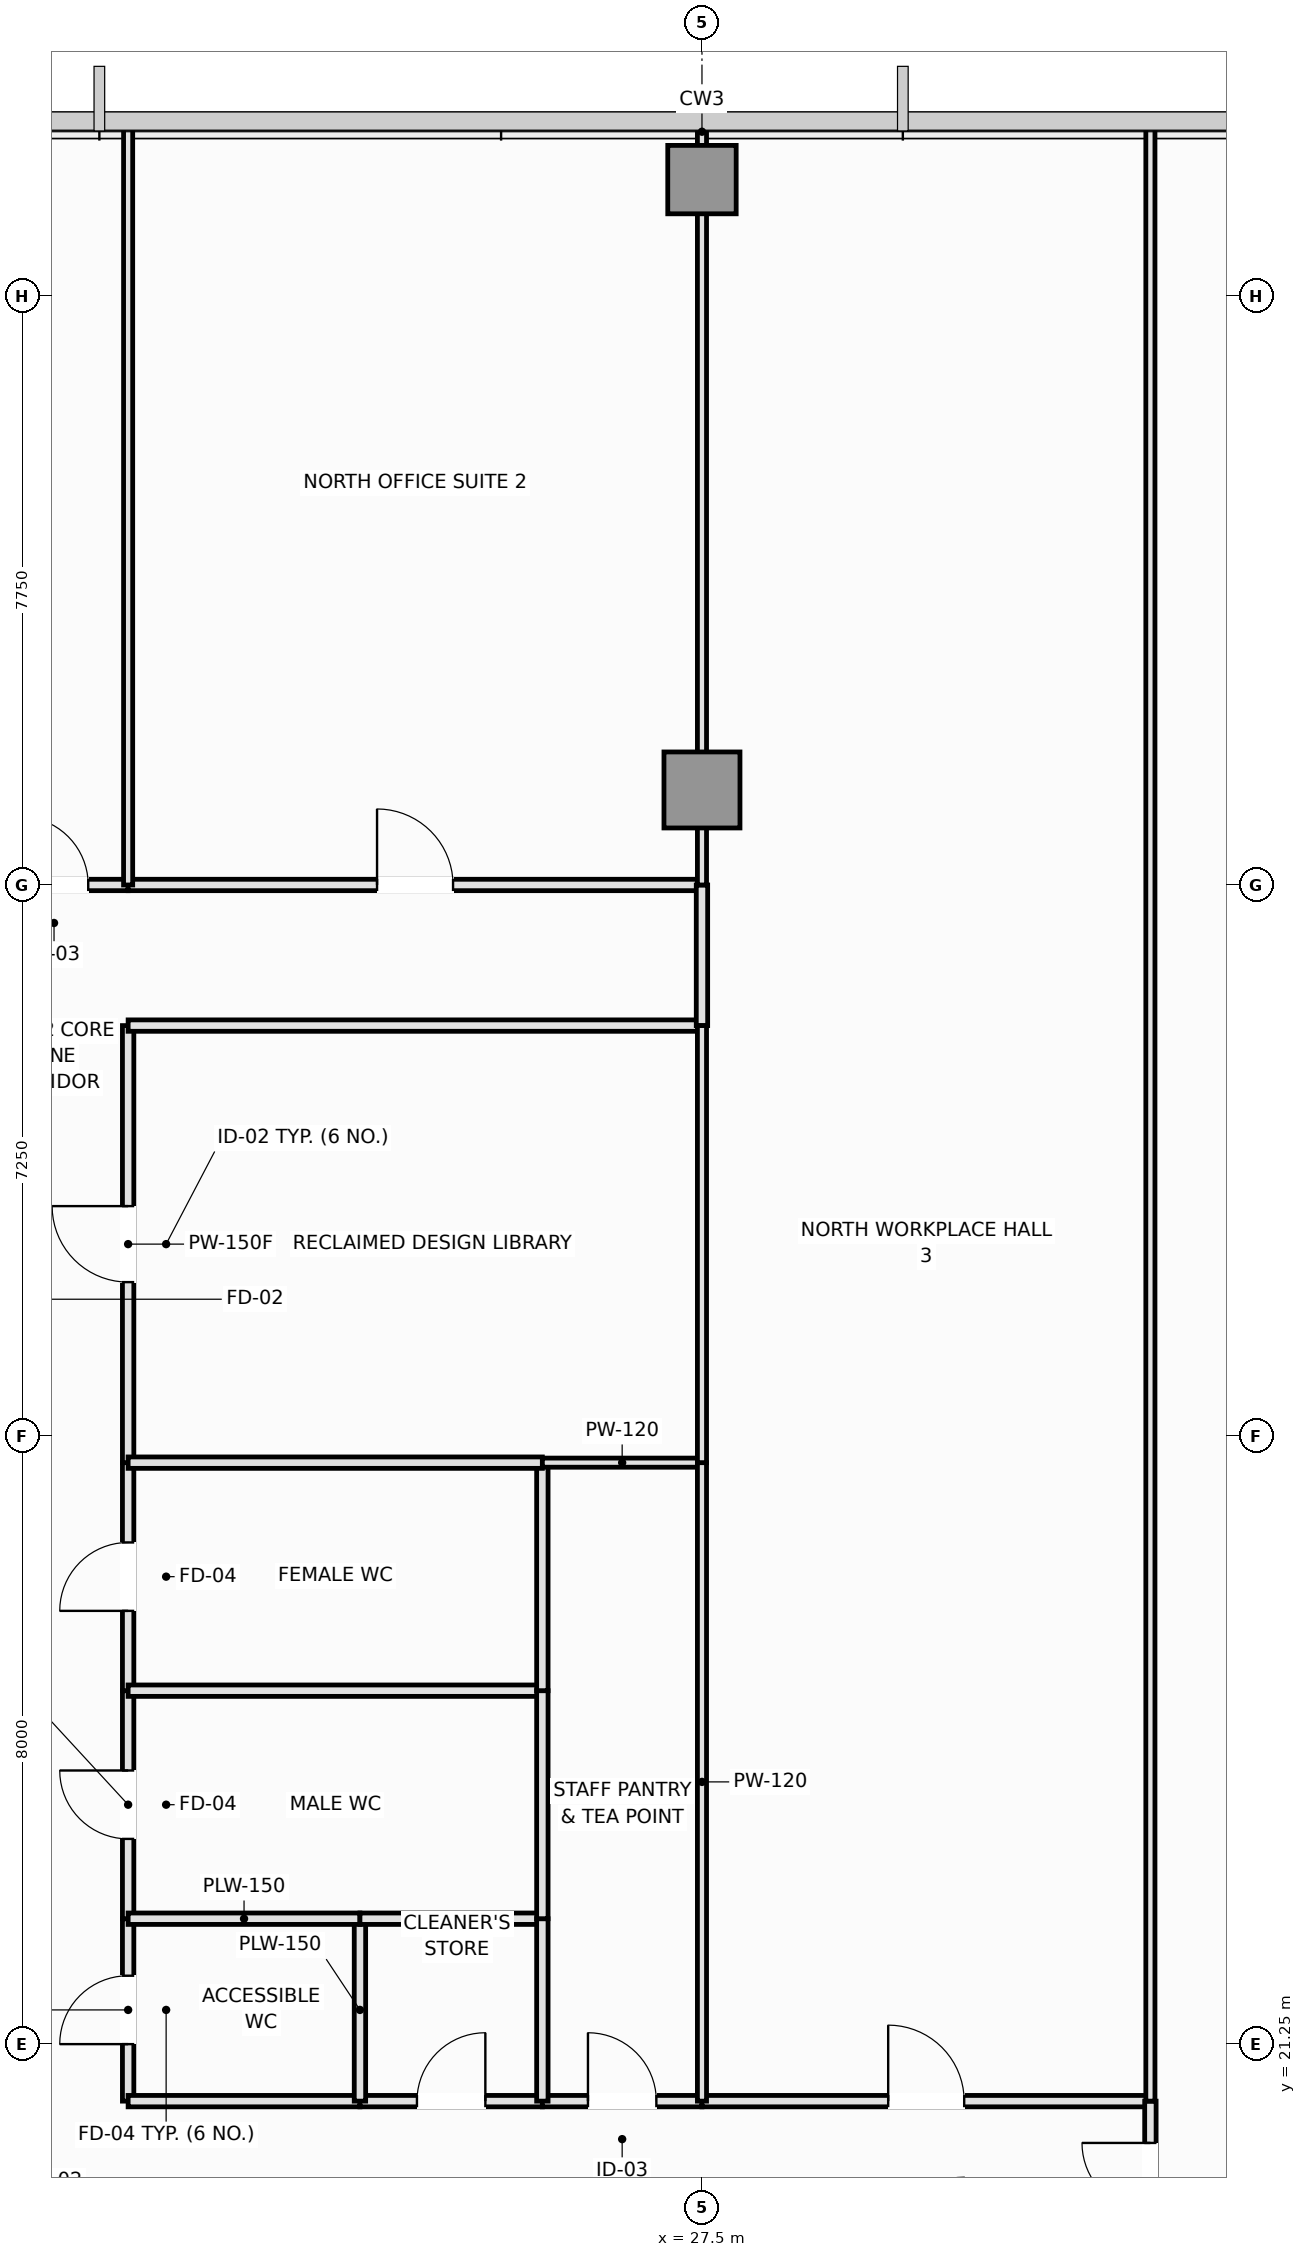
"""IFC4 building model, lengths in metres.
Left out: names, types, materials, properties, quantities, classifications, styles, units other than length and angle.
Written with IfcOpenShell. Run it as: python <this file> out.ifc"""

import sys

from ifc_helpers import new_model, si_unit, direction, frame, frame_2d, origin, origin_2d, place, context, subcontext, project, spatial, rectangle, extrude, element, fill, save


model = new_model("IFC4")
c1 = context("Model", 3, precision=1e-05, world=origin(), true_north=direction((0.0, 1.0)))
c2 = subcontext(c1, "Body", "Model", "MODEL_VIEW")
j1 = project(units=[si_unit("LENGTHUNIT", "METRE"), si_unit("PLANEANGLEUNIT", "RADIAN")], contexts=[c1])
p1 = place(None, origin())
s1 = spatial("IfcSite", under=j1, at=p1, CompositionType="ELEMENT")
p2 = place(p1, origin())
s2 = spatial("IfcBuilding", under=s1, at=p2, CompositionType="ELEMENT")
p3 = place(p2, frame((0.0, 0.0, 137.75)))
s3 = spatial("IfcBuildingStorey", under=s2, at=p3, CompositionType="ELEMENT", Elevation=137.75)
p4 = place(p3, frame((27.5, 37.75, 0.0), z_axis=(0.0, 0.0, 1.0), x_axis=(1.0, 0.0, 0.0)))
e1 = element("IfcColumn", 1, at=p4, inside=s3, PredefinedType="COLUMN", context=c2, shape_type="SweptSolid", body=[
    extrude(rectangle(XDim=1.0, YDim=1.0, at=origin_2d()), origin(), (0.0, 0.0, 1.0), 3.55),
])
p5 = place(p3, frame((27.5, 45.78, 0.0), z_axis=(0.0, 0.0, 1.0), x_axis=(1.0, 0.0, 0.0)))
e2 = element("IfcColumn", 2, at=p5, inside=s3, PredefinedType="COLUMN", context=c2, shape_type="SweptSolid", body=[
    extrude(rectangle(XDim=0.9, YDim=0.9, at=origin_2d()), origin(), (0.0, 0.0, 1.0), 3.55),
])
p6 = place(p3, frame((19.95, 20.5, 0.0), z_axis=(0.0, 0.0, 1.0), x_axis=(0.0, 1.0, 0.0)))
e3 = element("IfcWall", 3, at=p6, inside=s3, PredefinedType="PLUMBINGWALL", context=c2, shape_type="SweptSolid", body=[
    extrude(rectangle(XDim=2.4, YDim=0.15, at=frame_2d((1.2, 0.0))), origin(), (0.0, 0.0, 1.0), 3.37),
])
p7 = place(p6, frame((0.75, 0.0, 0.0)))
e4 = element("IfcOpeningElement", 4, at=p7, cuts=e3, PredefinedType="OPENING", context=c2, shape_type="SweptSolid", body=[
    extrude(rectangle(XDim=0.9, YDim=2.1, at=frame_2d((0.45, 1.05))), frame((0.0, 0.085, 0.0), z_axis=(0.0, -1.0, 0.0), x_axis=(1.0, 0.0, 0.0)), (0.0, 0.0, 1.0), 0.17),
])
p8 = place(p3, frame((19.95, 22.9, 0.0), z_axis=(0.0, 0.0, 1.0), x_axis=(0.0, 1.0, 0.0)))
e5 = element("IfcWall", 5, at=p8, inside=s3, PredefinedType="PLUMBINGWALL", context=c2, shape_type="SweptSolid", body=[
    extrude(rectangle(XDim=3.0, YDim=0.15, at=frame_2d((1.5, 0.0))), origin(), (0.0, 0.0, 1.0), 3.37),
])
p9 = place(p8, frame((1.05, 0.0, 0.0)))
e6 = element("IfcOpeningElement", 6, at=p9, cuts=e5, PredefinedType="OPENING", context=c2, shape_type="SweptSolid", body=[
    extrude(rectangle(XDim=0.9, YDim=2.1, at=frame_2d((0.45, 1.05))), frame((0.0, 0.085, 0.0), z_axis=(0.0, -1.0, 0.0), x_axis=(1.0, 0.0, 0.0)), (0.0, 0.0, 1.0), 0.17),
])
p10 = place(p3, frame((19.95, 25.9, 0.0), z_axis=(0.0, 0.0, 1.0), x_axis=(0.0, 1.0, 0.0)))
e7 = element("IfcWall", 7, at=p10, inside=s3, PredefinedType="PLUMBINGWALL", context=c2, shape_type="SweptSolid", body=[
    extrude(rectangle(XDim=3.0, YDim=0.15, at=frame_2d((1.5, 0.0))), origin(), (0.0, 0.0, 1.0), 3.37),
])
p11 = place(p10, frame((1.05, 0.0, 0.0)))
e8 = element("IfcOpeningElement", 8, at=p11, cuts=e7, PredefinedType="OPENING", context=c2, shape_type="SweptSolid", body=[
    extrude(rectangle(XDim=0.9, YDim=2.1, at=frame_2d((0.45, 1.05))), frame((0.0, 0.085, 0.0), z_axis=(0.0, -1.0, 0.0), x_axis=(1.0, 0.0, 0.0)), (0.0, 0.0, 1.0), 0.17),
])
p12 = place(p3, frame((19.95, 28.9, 0.0), z_axis=(0.0, 0.0, 1.0), x_axis=(0.0, 1.0, 0.0)))
e9 = element("IfcWall", 9, at=p12, inside=s3, PredefinedType="PARTITIONING", context=c2, shape_type="SweptSolid", body=[
    extrude(rectangle(XDim=5.75, YDim=0.15, at=frame_2d((2.875, 0.0))), origin(), (0.0, 0.0, 1.0), 3.37),
])
p13 = place(p12, frame((2.375, 0.0, 0.0)))
e10 = element("IfcOpeningElement", 10, at=p13, cuts=e9, PredefinedType="OPENING", context=c2, shape_type="SweptSolid", body=[
    extrude(rectangle(XDim=1.0, YDim=2.15, at=frame_2d((0.5, 1.075))), frame((0.0, 0.085, 0.0), z_axis=(0.0, -1.0, 0.0), x_axis=(1.0, 0.0, 0.0)), (0.0, 0.0, 1.0), 0.17),
])
p14 = place(p3, frame((18.0, 36.5, 0.0), z_axis=(0.0, 0.0, 1.0), x_axis=(1.0, 0.0, 0.0)))
e11 = element("IfcWall", 11, at=p14, inside=s3, PredefinedType="PARTITIONING", context=c2, shape_type="SweptSolid", body=[
    extrude(rectangle(XDim=1.95, YDim=0.15, at=frame_2d((0.975, 0.0))), origin(), (0.0, 0.0, 1.0), 3.37),
])
p15 = place(p14, frame((0.525, 0.0, 0.0)))
e12 = element("IfcOpeningElement", 12, at=p15, cuts=e11, PredefinedType="OPENING", context=c2, shape_type="SweptSolid", body=[
    extrude(rectangle(XDim=0.9, YDim=2.1, at=frame_2d((0.45, 1.05))), frame((0.0, 0.085, 0.0), z_axis=(0.0, -1.0, 0.0), x_axis=(1.0, 0.0, 0.0)), (0.0, 0.0, 1.0), 0.17),
])
p16 = place(p3, frame((19.95, 20.5, 0.0), z_axis=(0.0, 0.0, 1.0), x_axis=(1.0, 0.0, 0.0)))
e13 = element("IfcWall", 13, at=p16, inside=s3, PredefinedType="PLUMBINGWALL", context=c2, shape_type="SweptSolid", body=[
    extrude(rectangle(XDim=3.05, YDim=0.15, at=frame_2d((1.525, 0.0))), origin(), (0.0, 0.0, 1.0), 3.37),
])
p17 = place(p3, frame((23.0, 20.5, 0.0), z_axis=(0.0, 0.0, 1.0), x_axis=(1.0, 0.0, 0.0)))
e14 = element("IfcWall", 14, at=p17, inside=s3, PredefinedType="PLUMBINGWALL", context=c2, shape_type="SweptSolid", body=[
    extrude(rectangle(XDim=2.4, YDim=0.15, at=frame_2d((1.2, 0.0))), origin(), (0.0, 0.0, 1.0), 3.37),
])
p18 = place(p17, frame((0.75, 0.0, 0.0)))
e15 = element("IfcOpeningElement", 15, at=p18, cuts=e14, PredefinedType="OPENING", context=c2, shape_type="SweptSolid", body=[
    extrude(rectangle(XDim=0.9, YDim=2.1, at=frame_2d((0.45, 1.05))), frame((0.0, 0.085, 0.0), z_axis=(0.0, -1.0, 0.0), x_axis=(1.0, 0.0, 0.0)), (0.0, 0.0, 1.0), 0.17),
])
p19 = place(p3, frame((25.4, 20.5, 0.0), z_axis=(0.0, 0.0, 1.0), x_axis=(1.0, 0.0, 0.0)))
e16 = element("IfcWall", 16, at=p19, inside=s3, PredefinedType="PARTITIONING", context=c2, shape_type="SweptSolid", body=[
    extrude(rectangle(XDim=2.1, YDim=0.15, at=frame_2d((1.05, 0.0))), origin(), (0.0, 0.0, 1.0), 3.37),
])
p20 = place(p19, frame((0.6, 0.0, 0.0)))
e17 = element("IfcOpeningElement", 17, at=p20, cuts=e16, PredefinedType="OPENING", context=c2, shape_type="SweptSolid", body=[
    extrude(rectangle(XDim=0.9, YDim=2.1, at=frame_2d((0.45, 1.05))), frame((0.0, 0.085, 0.0), z_axis=(0.0, -1.0, 0.0), x_axis=(1.0, 0.0, 0.0)), (0.0, 0.0, 1.0), 0.17),
])
p21 = place(p3, frame((27.5, 20.5, 0.0), z_axis=(0.0, 0.0, 1.0), x_axis=(1.0, 0.0, 0.0)))
e18 = element("IfcWall", 18, at=p21, inside=s3, PredefinedType="PARTITIONING", context=c2, shape_type="SweptSolid", body=[
    extrude(rectangle(XDim=5.9, YDim=0.15, at=frame_2d((2.95, 0.0))), origin(), (0.0, 0.0, 1.0), 3.37),
])
p22 = place(p21, frame((2.45, 0.0, 0.0)))
e19 = element("IfcOpeningElement", 19, at=p22, cuts=e18, PredefinedType="OPENING", context=c2, shape_type="SweptSolid", body=[
    extrude(rectangle(XDim=1.0, YDim=2.15, at=frame_2d((0.5, 1.075))), frame((0.0, 0.085, 0.0), z_axis=(0.0, -1.0, 0.0), x_axis=(1.0, 0.0, 0.0)), (0.0, 0.0, 1.0), 0.17),
])
p23 = place(p3, frame((33.4, 18.5, 0.0), z_axis=(0.0, 0.0, 1.0), x_axis=(0.0, 1.0, 0.0)))
e20 = element("IfcWall", 20, at=p23, inside=s3, PredefinedType="PARTITIONING", context=c2, shape_type="SweptSolid", body=[
    extrude(rectangle(XDim=2.0, YDim=0.15, at=frame_2d((1.0, 0.0))), origin(), (0.0, 0.0, 1.0), 3.37),
])
p24 = place(p23, frame((0.55, 0.0, 0.0)))
e21 = element("IfcOpeningElement", 21, at=p24, cuts=e20, PredefinedType="OPENING", context=c2, shape_type="SweptSolid", body=[
    extrude(rectangle(XDim=0.9, YDim=2.1, at=frame_2d((0.45, 1.05))), frame((0.0, 0.085, 0.0), z_axis=(0.0, -1.0, 0.0), x_axis=(1.0, 0.0, 0.0)), (0.0, 0.0, 1.0), 0.17),
])
p25 = place(p3, frame((19.95, 34.65, 0.0), z_axis=(0.0, 0.0, 1.0), x_axis=(1.0, 0.0, 0.0)))
e22 = element("IfcWall", 22, at=p25, inside=s3, PredefinedType="PARTITIONING", context=c2, shape_type="SweptSolid", body=[
    extrude(rectangle(XDim=7.55, YDim=0.15, at=frame_2d((3.775, 0.0))), origin(), (0.0, 0.0, 1.0), 3.37),
])
p26 = place(p3, frame((19.95, 36.5, 0.0), z_axis=(0.0, 0.0, 1.0), x_axis=(1.0, 0.0, 0.0)))
e23 = element("IfcWall", 23, at=p26, inside=s3, PredefinedType="PARTITIONING", context=c2, shape_type="SweptSolid", body=[
    extrude(rectangle(XDim=7.55, YDim=0.15, at=frame_2d((3.775, 0.0))), origin(), (0.0, 0.0, 1.0), 3.37),
])
p27 = place(p26, frame((3.275, 0.0, 0.0)))
e24 = element("IfcOpeningElement", 24, at=p27, cuts=e23, PredefinedType="OPENING", context=c2, shape_type="SweptSolid", body=[
    extrude(rectangle(XDim=1.0, YDim=2.15, at=frame_2d((0.5, 1.075))), frame((0.0, 0.085, 0.0), z_axis=(0.0, -1.0, 0.0), x_axis=(1.0, 0.0, 0.0)), (0.0, 0.0, 1.0), 0.17),
])
p28 = place(p3, frame((27.5, 34.65, 0.0), z_axis=(0.0, 0.0, 1.0), x_axis=(0.0, 1.0, 0.0)))
e25 = element("IfcWall", 25, at=p28, inside=s3, PredefinedType="PARTITIONING", context=c2, shape_type="SweptSolid", body=[
    extrude(rectangle(XDim=1.85, YDim=0.15, at=frame_2d((0.925, 0.0))), origin(), (0.0, 0.0, 1.0), 3.37),
])
p29 = place(p3, frame((23.0, 20.5, 0.0), z_axis=(0.0, 0.0, 1.0), x_axis=(0.0, 1.0, 0.0)))
e26 = element("IfcWall", 26, at=p29, inside=s3, PredefinedType="PLUMBINGWALL", context=c2, shape_type="SweptSolid", body=[
    extrude(rectangle(XDim=2.4, YDim=0.15, at=frame_2d((1.2, 0.0))), origin(), (0.0, 0.0, 1.0), 3.37),
])
p30 = place(p3, frame((19.95, 22.9, 0.0), z_axis=(0.0, 0.0, 1.0), x_axis=(1.0, 0.0, 0.0)))
e27 = element("IfcWall", 27, at=p30, inside=s3, PredefinedType="PLUMBINGWALL", context=c2, shape_type="SweptSolid", body=[
    extrude(rectangle(XDim=3.05, YDim=0.15, at=frame_2d((1.525, 0.0))), origin(), (0.0, 0.0, 1.0), 3.37),
])
for number, where, z_axis, x_axis in (
    (28, (23.0, 22.9, 0.0), (0.0, 0.0, 1.0), (1.0, 0.0, 0.0)),
    (29, (25.4, 20.5, 0.0), (0.0, 0.0, 1.0), (0.0, 1.0, 0.0)),
):
    element("IfcWall", number, at=place(p3, frame(where, z_axis=z_axis, x_axis=x_axis)), inside=s3, PredefinedType="PLUMBINGWALL", context=c2, shape_type="SweptSolid", body=[
        extrude(rectangle(XDim=2.4, YDim=0.15, at=frame_2d((1.2, 0.0))), origin(), (0.0, 0.0, 1.0), 3.37),
    ])
p31 = place(p3, frame((19.95, 25.9, 0.0), z_axis=(0.0, 0.0, 1.0), x_axis=(1.0, 0.0, 0.0)))
e30 = element("IfcWall", 30, at=p31, inside=s3, PredefinedType="PLUMBINGWALL", context=c2, shape_type="SweptSolid", body=[
    extrude(rectangle(XDim=5.45, YDim=0.15, at=frame_2d((2.725, 0.0))), origin(), (0.0, 0.0, 1.0), 3.37),
])
for number, where, z_axis, x_axis in (
    (31, (25.4, 22.9, 0.0), (0.0, 0.0, 1.0), (0.0, 1.0, 0.0)),
    (32, (25.4, 25.9, 0.0), (0.0, 0.0, 1.0), (0.0, 1.0, 0.0)),
):
    element("IfcWall", number, at=place(p3, frame(where, z_axis=z_axis, x_axis=x_axis)), inside=s3, PredefinedType="PLUMBINGWALL", context=c2, shape_type="SweptSolid", body=[
        extrude(rectangle(XDim=3.0, YDim=0.15, at=frame_2d((1.5, 0.0))), origin(), (0.0, 0.0, 1.0), 3.37),
    ])
p32 = place(p3, frame((19.95, 28.9, 0.0), z_axis=(0.0, 0.0, 1.0), x_axis=(1.0, 0.0, 0.0)))
e33 = element("IfcWall", 33, at=p32, inside=s3, PredefinedType="PLUMBINGWALL", context=c2, shape_type="SweptSolid", body=[
    extrude(rectangle(XDim=5.45, YDim=0.15, at=frame_2d((2.725, 0.0))), origin(), (0.0, 0.0, 1.0), 3.37),
])
p33 = place(p3, frame((25.4, 28.9, 0.0), z_axis=(0.0, 0.0, 1.0), x_axis=(1.0, 0.0, 0.0)))
e34 = element("IfcWall", 34, at=p33, inside=s3, PredefinedType="PARTITIONING", context=c2, shape_type="SweptSolid", body=[
    extrude(rectangle(XDim=2.1, YDim=0.12, at=frame_2d((1.05, 0.0))), origin(), (0.0, 0.0, 1.0), 3.37),
])
p34 = place(p3, frame((27.5, 20.5, 0.0), z_axis=(0.0, 0.0, 1.0), x_axis=(0.0, 1.0, 0.0)))
e35 = element("IfcWall", 35, at=p34, inside=s3, PredefinedType="PARTITIONING", context=c2, shape_type="SweptSolid", body=[
    extrude(rectangle(XDim=8.4, YDim=0.12, at=frame_2d((4.2, 0.0))), origin(), (0.0, 0.0, 1.0), 3.37),
])
p35 = place(p3, frame((27.5, 28.9, 0.0), z_axis=(0.0, 0.0, 1.0), x_axis=(0.0, 1.0, 0.0)))
e36 = element("IfcWall", 36, at=p35, inside=s3, PredefinedType="PARTITIONING", context=c2, shape_type="SweptSolid", body=[
    extrude(rectangle(XDim=5.75, YDim=0.12, at=frame_2d((2.875, 0.0))), origin(), (0.0, 0.0, 1.0), 3.37),
])
p36 = place(p3, frame((19.95, 36.5, 0.0), z_axis=(0.0, 0.0, 1.0), x_axis=(0.0, 1.0, 0.0)))
e37 = element("IfcWall", 37, at=p36, inside=s3, PredefinedType="PARTITIONING", context=c2, shape_type="SweptSolid", body=[
    extrude(rectangle(XDim=9.99, YDim=0.12, at=frame_2d((4.995, 0.0))), origin(), (0.0, 0.0, 1.0), 3.37),
])
p37 = place(p3, frame((27.5, 36.5, 0.0), z_axis=(0.0, 0.0, 1.0), x_axis=(0.0, 1.0, 0.0)))
e38 = element("IfcWall", 38, at=p37, inside=s3, PredefinedType="PARTITIONING", context=c2, shape_type="SweptSolid", body=[
    extrude(rectangle(XDim=9.99, YDim=0.12, at=frame_2d((4.995, 0.0))), origin(), (0.0, 0.0, 1.0), 2.87),
])
p38 = place(p3, frame((33.4, 20.5, 0.0), z_axis=(0.0, 0.0, 1.0), x_axis=(0.0, 1.0, 0.0)))
e39 = element("IfcWall", 39, at=p38, inside=s3, PredefinedType="PARTITIONING", context=c2, shape_type="SweptSolid", body=[
    extrude(rectangle(XDim=25.99, YDim=0.12, at=frame_2d((12.995, 0.0))), origin(), (0.0, 0.0, 1.0), 3.37),
])
p39 = place(p7, origin())
e40 = element("IfcDoor", 40, at=p39, inside=s3, OperationType="SINGLE_SWING_LEFT", PredefinedType="DOOR", context=c2, shape_type="SweptSolid", body=[
    extrude(rectangle(XDim=0.9, YDim=2.1, at=frame_2d((0.45, 1.05))), frame((0.0, 0.025, 0.0), z_axis=(0.0, -1.0, 0.0), x_axis=(1.0, 0.0, 0.0)), (0.0, 0.0, 1.0), 0.05),
])
fill(e4, e40)
p40 = place(p9, origin())
e41 = element("IfcDoor", 41, at=p40, inside=s3, OperationType="SINGLE_SWING_RIGHT", PredefinedType="DOOR", context=c2, shape_type="SweptSolid", body=[
    extrude(rectangle(XDim=0.9, YDim=2.1, at=frame_2d((0.45, 1.05))), frame((0.0, 0.025, 0.0), z_axis=(0.0, -1.0, 0.0), x_axis=(1.0, 0.0, 0.0)), (0.0, 0.0, 1.0), 0.05),
])
fill(e6, e41)
p41 = place(p11, origin())
e42 = element("IfcDoor", 42, at=p41, inside=s3, OperationType="SINGLE_SWING_LEFT", PredefinedType="DOOR", context=c2, shape_type="SweptSolid", body=[
    extrude(rectangle(XDim=0.9, YDim=2.1, at=frame_2d((0.45, 1.05))), frame((0.0, 0.025, 0.0), z_axis=(0.0, -1.0, 0.0), x_axis=(1.0, 0.0, 0.0)), (0.0, 0.0, 1.0), 0.05),
])
fill(e8, e42)
p42 = place(p13, origin())
e43 = element("IfcDoor", 43, at=p42, inside=s3, OperationType="SINGLE_SWING_RIGHT", PredefinedType="DOOR", context=c2, shape_type="SweptSolid", body=[
    extrude(rectangle(XDim=1.0, YDim=2.15, at=frame_2d((0.5, 1.075))), frame((0.0, 0.025, 0.0), z_axis=(0.0, -1.0, 0.0), x_axis=(1.0, 0.0, 0.0)), (0.0, 0.0, 1.0), 0.05),
])
fill(e10, e43)
p43 = place(p15, origin())
e44 = element("IfcDoor", 44, at=p43, inside=s3, OperationType="SINGLE_SWING_LEFT", PredefinedType="DOOR", context=c2, shape_type="SweptSolid", body=[
    extrude(rectangle(XDim=0.9, YDim=2.1, at=frame_2d((0.45, 1.05))), frame((0.0, 0.025, 0.0), z_axis=(0.0, -1.0, 0.0), x_axis=(1.0, 0.0, 0.0)), (0.0, 0.0, 1.0), 0.05),
])
fill(e12, e44)
p44 = place(p18, origin())
e45 = element("IfcDoor", 45, at=p44, inside=s3, OperationType="SINGLE_SWING_RIGHT", PredefinedType="DOOR", context=c2, shape_type="SweptSolid", body=[
    extrude(rectangle(XDim=0.9, YDim=2.1, at=frame_2d((0.45, 1.05))), frame((0.0, 0.025, 0.0), z_axis=(0.0, -1.0, 0.0), x_axis=(1.0, 0.0, 0.0)), (0.0, 0.0, 1.0), 0.05),
])
fill(e15, e45)
p45 = place(p20, origin())
e46 = element("IfcDoor", 46, at=p45, inside=s3, OperationType="SINGLE_SWING_LEFT", PredefinedType="DOOR", context=c2, shape_type="SweptSolid", body=[
    extrude(rectangle(XDim=0.9, YDim=2.1, at=frame_2d((0.45, 1.05))), frame((0.0, 0.025, 0.0), z_axis=(0.0, -1.0, 0.0), x_axis=(1.0, 0.0, 0.0)), (0.0, 0.0, 1.0), 0.05),
])
fill(e17, e46)
p46 = place(p22, origin())
e47 = element("IfcDoor", 47, at=p46, inside=s3, OperationType="SINGLE_SWING_LEFT", PredefinedType="DOOR", context=c2, shape_type="SweptSolid", body=[
    extrude(rectangle(XDim=1.0, YDim=2.15, at=frame_2d((0.5, 1.075))), frame((0.0, 0.025, 0.0), z_axis=(0.0, -1.0, 0.0), x_axis=(1.0, 0.0, 0.0)), (0.0, 0.0, 1.0), 0.05),
])
fill(e19, e47)
p47 = place(p24, origin())
e48 = element("IfcDoor", 48, at=p47, inside=s3, OperationType="SINGLE_SWING_RIGHT", PredefinedType="DOOR", context=c2, shape_type="SweptSolid", body=[
    extrude(rectangle(XDim=0.9, YDim=2.1, at=frame_2d((0.45, 1.05))), frame((0.0, 0.025, 0.0), z_axis=(0.0, -1.0, 0.0), x_axis=(1.0, 0.0, 0.0)), (0.0, 0.0, 1.0), 0.05),
])
fill(e21, e48)
p48 = place(p27, origin())
e49 = element("IfcDoor", 49, at=p48, inside=s3, OperationType="SINGLE_SWING_LEFT", PredefinedType="DOOR", context=c2, shape_type="SweptSolid", body=[
    extrude(rectangle(XDim=1.0, YDim=2.15, at=frame_2d((0.5, 1.075))), frame((0.0, 0.025, 0.0), z_axis=(0.0, -1.0, 0.0), x_axis=(1.0, 0.0, 0.0)), (0.0, 0.0, 1.0), 0.05),
])
fill(e24, e49)
save(model, sys.argv[1])
